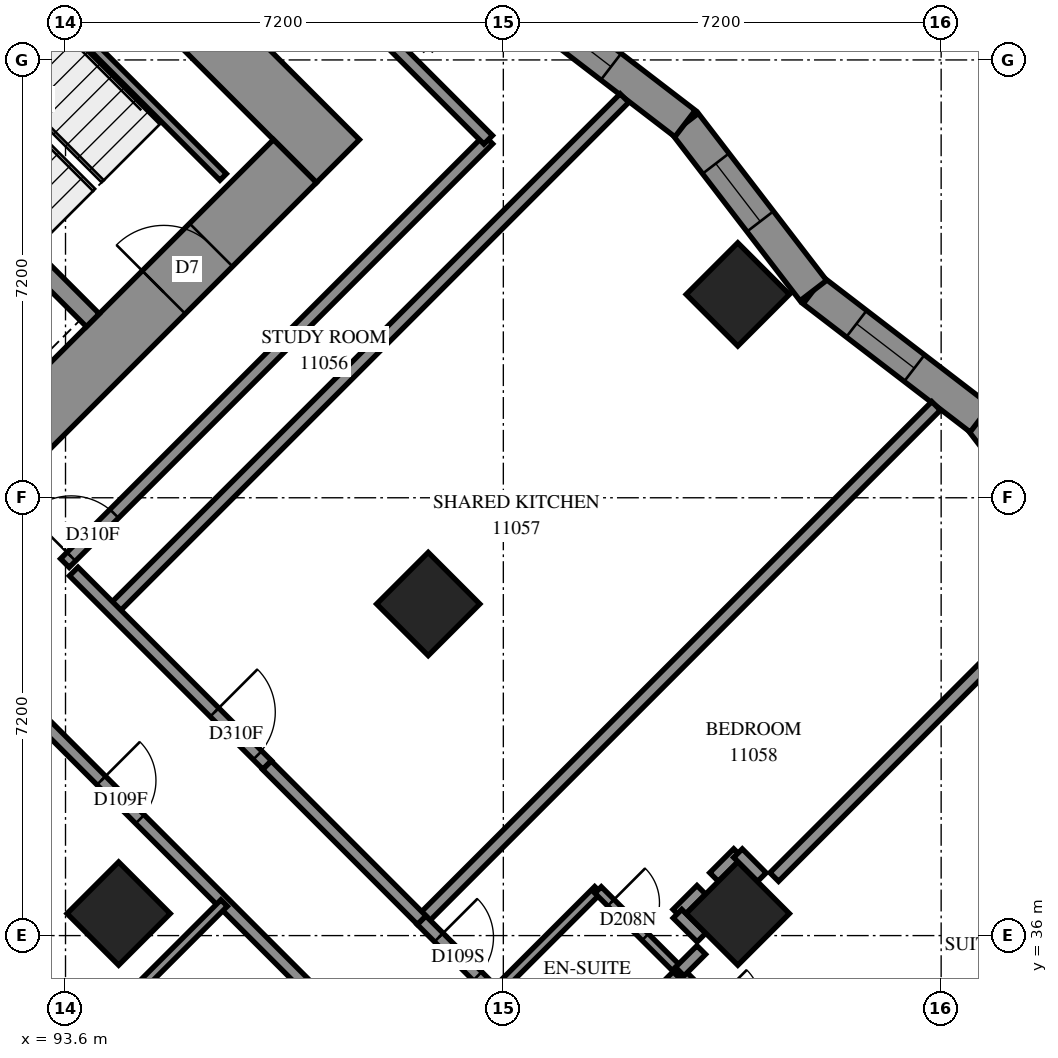
"""IFC4 building model, lengths in metres.
Left out: names, types, materials, properties, quantities, classifications, styles, units other than length and angle.
Written with IfcOpenShell. Run it as: python <this file> out.ifc"""

import sys

from ifc_helpers import new_model, si_unit, direction, frame, frame_2d, origin, origin_2d, place, context, subcontext, project, spatial, polyline, rectangle, outline, extrude, element, fill, save


model = new_model("IFC4")
c1 = context("Model", 3, precision=1e-05, world=origin(), true_north=direction((0.0, 1.0)))
c2 = subcontext(c1, "Body", "Model", "MODEL_VIEW")
j1 = project(units=[si_unit("LENGTHUNIT", "METRE"), si_unit("PLANEANGLEUNIT", "RADIAN")], contexts=[c1])
p1 = place(None, origin())
s1 = spatial("IfcSite", under=j1, at=p1, CompositionType="ELEMENT")
p2 = place(p1, origin())
s2 = spatial("IfcBuilding", under=s1, at=p2, CompositionType="ELEMENT")
p3 = place(p2, frame((0.0, 0.0, 44.0)))
s3 = spatial("IfcBuildingStorey", under=s2, at=p3, CompositionType="ELEMENT", Elevation=44.0)
for number, where, z_axis, x_axis in (
    (1, (104.656, 46.544, 0.0), (0.0, 0.0, 1.0), (0.707, -0.707, 0.0)),
    (2, (99.565, 41.453, 0.0), (0.0, 0.0, 1.0), (0.707, -0.707, 0.0)),
    (3, (94.474, 36.362, 0.0), (0.0, 0.0, 1.0), (0.707, -0.707, 0.0)),
    (4, (104.656, 36.362, 0.0), (0.0, 0.0, 1.0), (0.707, -0.707, 0.0)),
):
    element("IfcColumn", number, at=place(p3, frame(where, z_axis=z_axis, x_axis=x_axis)), inside=s3, PredefinedType="COLUMN", context=c2, shape_type="SweptSolid", body=[
        extrude(rectangle(XDim=1.2, YDim=1.2, at=origin_2d()), origin(), (0.0, 0.0, 1.0), 3.1),
    ])
p4 = place(p3, frame((86.483, 60.333, -0.3), z_axis=(0.0, 0.0, 1.0), x_axis=(0.70710983, -0.7071037324, 0.0)))
e5 = element("IfcWall", 5, at=p4, inside=s3, PredefinedType="SHEAR", context=c2, shape_type="SweptSolid", body=[
    extrude(rectangle(XDim=16.4, YDim=1.0, at=frame_2d((8.2, 0.0))), origin(), (0.0, 0.0, 1.0), 2.7),
])
p5 = place(p4, frame((11.0, 0.0, 0.3)))
e6 = element("IfcOpeningElement", 6, at=p5, cuts=e5, PredefinedType="OPENING", context=c2, shape_type="SweptSolid", body=[
    extrude(rectangle(XDim=0.8, YDim=2.1, at=frame_2d((0.4, 1.05))), frame((0.0, 0.51, 0.0), z_axis=(0.0, -1.0, 0.0), x_axis=(1.0, 0.0, 0.0)), (0.0, 0.0, 1.0), 1.02),
])
p6 = place(p3, frame((87.19, 38.554, -0.3), z_axis=(0.0, 0.0, 1.0), x_axis=(0.707103309, 0.7071102534, 0.0)))
e7 = element("IfcWall", 7, at=p6, inside=s3, PredefinedType="SHEAR", context=c2, shape_type="SweptSolid", body=[
    extrude(rectangle(XDim=14.4, YDim=1.0, at=frame_2d((7.2, 0.0))), origin(), (0.0, 0.0, 1.0), 2.7),
])
p7 = place(p6, frame((4.55, 0.0, 0.3)))
e8 = element("IfcOpeningElement", 8, at=p7, cuts=e7, PredefinedType="OPENING", context=c2, shape_type="SweptSolid", body=[
    extrude(rectangle(XDim=1.1, YDim=2.1, at=frame_2d((0.55, 1.05))), frame((0.0, 0.51, 0.0), z_axis=(0.0, -1.0, 0.0), x_axis=(1.0, 0.0, 0.0)), (0.0, 0.0, 1.0), 1.02),
])
p8 = place(p6, frame((11.35, 0.0, 0.3)))
e9 = element("IfcOpeningElement", 9, at=p8, cuts=e7, PredefinedType="OPENING", context=c2, shape_type="SweptSolid", body=[
    extrude(rectangle(XDim=1.1, YDim=2.1, at=frame_2d((0.55, 1.05))), frame((0.0, 0.51, 0.0), z_axis=(0.0, -1.0, 0.0), x_axis=(1.0, 0.0, 0.0)), (0.0, 0.0, 1.0), 1.02),
])
p9 = place(p3, frame((88.958, 51.211, 0.0), z_axis=(0.0, 0.0, 1.0), x_axis=(0.7070998367, -0.7071137256, 0.0)))
e10 = element("IfcWall", 10, at=p9, inside=s3, PredefinedType="SOLIDWALL", context=c2, shape_type="SweptSolid", body=[
    extrude(rectangle(XDim=7.2, YDim=0.3, at=frame_2d((3.6, 0.0))), origin(), (0.0, 0.0, 1.0), 3.1),
])
p10 = place(p3, frame((110.753, 41.752, 0.0), z_axis=(0.0, 0.0, 1.0), x_axis=(-0.6090043207, 0.7931669038, 0.0)))
e11 = element("IfcWall", 11, at=p10, inside=s3, PredefinedType="SOLIDWALL", context=c2, shape_type="SweptSolid", body=[
    extrude(outline(polyline([(0.036, -0.275), (3.499, -0.275), (3.427, 0.275), (-0.036, 0.275), (0.036, -0.275)])), origin(), (0.0, 0.0, 1.0), 3.1),
])
p11 = place(p10, frame((1.315, 0.0, 0.5)))
e12 = element("IfcOpeningElement", 12, at=p11, cuts=e11, PredefinedType="OPENING", context=c2, shape_type="SweptSolid", body=[
    extrude(rectangle(XDim=1.2, YDim=2.45, at=frame_2d((0.6, 1.225))), frame((0.0, 0.285, 0.0), z_axis=(0.0, -1.0, 0.0), x_axis=(1.0, 0.0, 0.0)), (0.0, 0.0, 1.0), 0.57),
])
p12 = place(p3, frame((108.644, 44.498, 0.0), z_axis=(0.0, 0.0, 1.0), x_axis=(-0.7931776144, 0.6089903711, 0.0)))
e13 = element("IfcWall", 13, at=p12, inside=s3, PredefinedType="SOLIDWALL", context=c2, shape_type="SweptSolid", body=[
    extrude(outline(polyline([(-0.036, -0.275), (3.427, -0.275), (3.499, 0.275), (0.036, 0.275), (-0.036, -0.275)])), origin(), (0.0, 0.0, 1.0), 3.1),
])
p13 = place(p12, frame((1.368, 0.0, 0.5)))
e14 = element("IfcOpeningElement", 14, at=p13, cuts=e13, PredefinedType="OPENING", context=c2, shape_type="SweptSolid", body=[
    extrude(rectangle(XDim=1.2, YDim=2.45, at=frame_2d((0.6, 1.225))), frame((0.0, 0.285, 0.0), z_axis=(0.0, -1.0, 0.0), x_axis=(1.0, 0.0, 0.0)), (0.0, 0.0, 1.0), 0.57),
])
p14 = place(p3, frame((105.898, 46.607, 0.0), z_axis=(0.0, 0.0, 1.0), x_axis=(-0.6089903711, 0.7931776144, 0.0)))
e15 = element("IfcWall", 15, at=p14, inside=s3, PredefinedType="SOLIDWALL", context=c2, shape_type="SweptSolid", body=[
    extrude(outline(polyline([(0.036, -0.275), (3.499, -0.275), (3.427, 0.275), (-0.036, 0.275), (0.036, -0.275)])), origin(), (0.0, 0.0, 1.0), 3.1),
])
p15 = place(p14, frame((1.434, 0.0, 0.5)))
e16 = element("IfcOpeningElement", 16, at=p15, cuts=e15, PredefinedType="OPENING", context=c2, shape_type="SweptSolid", body=[
    extrude(rectangle(XDim=1.2, YDim=2.45, at=frame_2d((0.6, 1.225))), frame((0.0, 0.285, 0.0), z_axis=(0.0, -1.0, 0.0), x_axis=(1.0, 0.0, 0.0)), (0.0, 0.0, 1.0), 0.57),
])
p16 = place(p3, frame((103.789, 49.354, 0.0), z_axis=(0.0, 0.0, 1.0), x_axis=(-0.7931776144, 0.6089903711, 0.0)))
e17 = element("IfcWall", 17, at=p16, inside=s3, PredefinedType="SOLIDWALL", context=c2, shape_type="SweptSolid", body=[
    extrude(outline(polyline([(-0.036, -0.275), (3.427, -0.275), (3.499, 0.275), (0.036, 0.275), (-0.036, -0.275)])), origin(), (0.0, 0.0, 1.0), 3.1),
])
p17 = place(p16, frame((1.536, 0.0, 0.5)))
e18 = element("IfcOpeningElement", 18, at=p17, cuts=e17, PredefinedType="OPENING", context=c2, shape_type="SweptSolid", body=[
    extrude(rectangle(XDim=1.2, YDim=2.45, at=frame_2d((0.6, 1.225))), frame((0.0, 0.285, 0.0), z_axis=(0.0, -1.0, 0.0), x_axis=(1.0, 0.0, 0.0)), (0.0, 0.0, 1.0), 0.57),
])
p18 = place(p3, frame((91.313, 53.354, 0.0), z_axis=(0.0, 0.0, 1.0), x_axis=(0.7071140275, -0.7070995348, 0.0)))
e19 = element("IfcWall", 19, at=p18, inside=s3, PredefinedType="PARTITIONING", context=c2, shape_type="SweptSolid", body=[
    extrude(rectangle(XDim=6.9, YDim=0.15, at=frame_2d((3.45, 0.0))), origin(), (0.0, 0.0, 1.0), 3.1),
])
p19 = place(p3, frame((99.459, 36.255, 0.0), z_axis=(0.0, 0.0, 1.0), x_axis=(0.7071903932, 0.7070231593, 0.0)))
e20 = element("IfcWall", 20, at=p19, inside=s3, PredefinedType="PARTITIONING", context=c2, shape_type="SweptSolid", body=[
    extrude(rectangle(XDim=11.959, YDim=0.2, at=frame_2d((5.98, 0.0))), origin(), (0.0, 0.0, 1.0), 3.1),
])
p20 = place(p3, frame((94.367, 41.349, 0.0), z_axis=(0.0, 0.0, 1.0), x_axis=(0.7071109781, 0.7071025843, 0.0)))
e21 = element("IfcWall", 21, at=p20, inside=s3, PredefinedType="PARTITIONING", context=c2, shape_type="SweptSolid", body=[
    extrude(rectangle(XDim=11.914, YDim=0.2, at=frame_2d((5.957, 0.0))), origin(), (0.0, 0.0, 1.0), 3.1),
])
p21 = place(p3, frame((93.59, 42.126, 0.0), z_axis=(0.0, 0.0, 1.0), x_axis=(0.7071067812, 0.7071067812, 0.0)))
e22 = element("IfcWall", 22, at=p21, inside=s3, PredefinedType="PARTITIONING", context=c2, shape_type="SweptSolid", body=[
    extrude(rectangle(XDim=9.849, YDim=0.2, at=frame_2d((4.924, 0.0))), origin(), (0.0, 0.0, 1.0), 3.1),
])
p22 = place(p21, frame((0.148, 0.0, 0.0)))
e23 = element("IfcOpeningElement", 23, at=p22, cuts=e22, PredefinedType="OPENING", context=c2, shape_type="SweptSolid", body=[
    extrude(rectangle(XDim=1.0, YDim=2.1, at=frame_2d((0.5, 1.05))), frame((0.0, 0.11, 0.0), z_axis=(0.0, -1.0, 0.0), x_axis=(1.0, 0.0, 0.0)), (0.0, 0.0, 1.0), 0.22),
])
p23 = place(p3, frame((92.243, 40.495, 0.0), z_axis=(0.0, 0.0, 1.0), x_axis=(0.7071067812, -0.7071067812, 0.0)))
e24 = element("IfcWall", 24, at=p23, inside=s3, PredefinedType="PARTITIONING", context=c2, shape_type="SweptSolid", body=[
    extrude(rectangle(XDim=8.101, YDim=0.2, at=frame_2d((4.05, 0.0))), origin(), (0.0, 0.0, 1.0), 3.1),
])
p24 = place(p23, frame((2.75, 0.0, 0.0)))
e25 = element("IfcOpeningElement", 25, at=p24, cuts=e24, PredefinedType="OPENING", context=c2, shape_type="SweptSolid", body=[
    extrude(rectangle(XDim=0.9, YDim=2.1, at=frame_2d((0.45, 1.05))), frame((0.0, 0.11, 0.0), z_axis=(0.0, -1.0, 0.0), x_axis=(1.0, 0.0, 0.0)), (0.0, 0.0, 1.0), 0.22),
])
p25 = place(p3, frame((99.455, 36.253, 0.0), z_axis=(0.0, 0.0, 1.0), x_axis=(0.7071067812, -0.7071067812, 0.0)))
e26 = element("IfcWall", 26, at=p25, inside=s3, PredefinedType="PARTITIONING", context=c2, shape_type="SweptSolid", body=[
    extrude(rectangle(XDim=7.201, YDim=0.2, at=frame_2d((3.601, 0.0))), origin(), (0.0, 0.0, 1.0), 3.1),
])
p26 = place(p25, frame((0.401, 0.0, 0.0)))
e27 = element("IfcOpeningElement", 27, at=p26, cuts=e26, PredefinedType="OPENING", context=c2, shape_type="SweptSolid", body=[
    extrude(rectangle(XDim=0.9, YDim=2.1, at=frame_2d((0.45, 1.05))), frame((0.0, 0.11, 0.0), z_axis=(0.0, -1.0, 0.0), x_axis=(1.0, 0.0, 0.0)), (0.0, 0.0, 1.0), 0.22),
])
p27 = place(p3, frame((105.255, 36.963, 0.0), z_axis=(0.0, 0.0, 1.0), x_axis=(0.7071067812, 0.7071067812, 0.0)))
e28 = element("IfcWall", 28, at=p27, inside=s3, PredefinedType="PARTITIONING", context=c2, shape_type="SweptSolid", body=[
    extrude(rectangle(XDim=5.504, YDim=0.2, at=frame_2d((2.752, 0.0))), origin(), (0.0, 0.0, 1.0), 3.1),
])
p28 = place(p3, frame((93.735, 41.987, 0.0), z_axis=(0.0, 0.0, 1.0), x_axis=(0.7071067812, -0.7071067812, 0.0)))
e29 = element("IfcWall", 29, at=p28, inside=s3, PredefinedType="PARTITIONING", context=c2, shape_type="SweptSolid", body=[
    extrude(rectangle(XDim=4.5, YDim=0.2, at=frame_2d((2.25, 0.0))), origin(), (0.0, 0.0, 1.0), 3.1),
])
p29 = place(p28, frame((3.274, 0.0, 0.0)))
e30 = element("IfcOpeningElement", 30, at=p29, cuts=e29, PredefinedType="OPENING", context=c2, shape_type="SweptSolid", body=[
    extrude(rectangle(XDim=1.0, YDim=2.1, at=frame_2d((0.5, 1.05))), frame((0.0, 0.11, 0.0), z_axis=(0.0, -1.0, 0.0), x_axis=(1.0, 0.0, 0.0)), (0.0, 0.0, 1.0), 0.22),
])
p30 = place(p3, frame((96.913, 38.801, 0.0), z_axis=(0.0, 0.0, 1.0), x_axis=(0.7068288851, -0.7073845681, 0.0)))
e31 = element("IfcWall", 31, at=p30, inside=s3, PredefinedType="PARTITIONING", context=c2, shape_type="SweptSolid", body=[
    extrude(rectangle(XDim=3.599, YDim=0.2, at=frame_2d((1.8, 0.0))), origin(), (0.0, 0.0, 1.0), 3.1),
])
p31 = place(p3, frame((98.783, 50.855, 0.0), z_axis=(0.0, 0.0, 1.0), x_axis=(0.7071067812, -0.7071067812, 0.0)))
e32 = element("IfcWall", 32, at=p31, inside=s3, PredefinedType="PARTITIONING", context=c2, shape_type="SweptSolid", body=[
    extrude(rectangle(XDim=2.5, YDim=0.2, at=frame_2d((1.25, 0.0))), origin(), (0.0, 0.0, 1.0), 3.1),
])
p32 = place(p3, frame((102.003, 33.711, 0.0), z_axis=(0.0, 0.0, 1.0), x_axis=(0.7071067812, 0.7071067812, 0.0)))
e33 = element("IfcWall", 33, at=p32, inside=s3, PredefinedType="PARTITIONING", context=c2, shape_type="SweptSolid", body=[
    extrude(rectangle(XDim=2.401, YDim=0.15, at=frame_2d((1.201, 0.0))), origin(), (0.0, 0.0, 1.0), 3.1),
])
for number, where, z_axis, x_axis in (
    (34, (94.511, 34.839, 0.0), (0.0, 0.0, 1.0), (0.708, 0.707, 0.0)),
    (35, (100.657, 35.057, 0.0), (0.0, 0.0, 1.0), (0.708, 0.707, 0.0)),
):
    element("IfcWall", number, at=place(p3, frame(where, z_axis=z_axis, x_axis=x_axis)), inside=s3, PredefinedType="PARTITIONING", context=c2, shape_type="SweptSolid", body=[
        extrude(rectangle(XDim=2.4, YDim=0.15, at=frame_2d((1.2, 0.0))), origin(), (0.0, 0.0, 1.0), 3.1),
    ])
p33 = place(p3, frame((103.701, 35.407, 0.0), z_axis=(0.0, 0.0, 1.0), x_axis=(0.7065800724, -0.7076330979, 0.0)))
e36 = element("IfcWall", 36, at=p33, inside=s3, PredefinedType="PARTITIONING", context=c2, shape_type="SweptSolid", body=[
    extrude(rectangle(XDim=1.899, YDim=0.15, at=frame_2d((0.95, 0.0))), origin(), (0.0, 0.0, 1.0), 3.1),
])
p34 = place(p33, frame((0.759, 0.0, 0.0)))
e37 = element("IfcOpeningElement", 37, at=p34, cuts=e36, PredefinedType="OPENING", context=c2, shape_type="SweptSolid", body=[
    extrude(rectangle(XDim=0.8, YDim=2.1, at=frame_2d((0.4, 1.05))), frame((0.0, 0.085, 0.0), z_axis=(0.0, -1.0, 0.0), x_axis=(1.0, 0.0, 0.0)), (0.0, 0.0, 1.0), 0.17),
])
p35 = place(p3, frame((102.358, 36.75, 0.0), z_axis=(0.0, 0.0, 1.0), x_axis=(0.7076330979, -0.7065800724, 0.0)))
e38 = element("IfcWall", 38, at=p35, inside=s3, PredefinedType="PARTITIONING", context=c2, shape_type="SweptSolid", body=[
    extrude(rectangle(XDim=1.899, YDim=0.15, at=frame_2d((0.95, 0.0))), origin(), (0.0, 0.0, 1.0), 3.1),
])
p36 = place(p35, frame((0.296, 0.0, 0.0)))
e39 = element("IfcOpeningElement", 39, at=p36, cuts=e38, PredefinedType="OPENING", context=c2, shape_type="SweptSolid", body=[
    extrude(rectangle(XDim=0.8, YDim=2.1, at=frame_2d((0.4, 1.05))), frame((0.0, 0.085, 0.0), z_axis=(0.0, -1.0, 0.0), x_axis=(1.0, 0.0, 0.0)), (0.0, 0.0, 1.0), 0.17),
])
for number, where, z_axis, x_axis in (
    (40, (103.661, 36.359, 0.0), (0.0, 0.0, 1.0), (0.707, 0.707, 0.0)),
    (41, (104.265, 36.963, 0.0), (0.0, 0.0, 1.0), (0.707, 0.707, 0.0)),
):
    element("IfcWall", number, at=place(p3, frame(where, z_axis=z_axis, x_axis=x_axis)), inside=s3, PredefinedType="PARTITIONING", context=c2, shape_type="SweptSolid", body=[
        extrude(rectangle(XDim=0.557, YDim=0.2, at=frame_2d((0.279, 0.0))), origin(), (0.0, 0.0, 1.0), 3.1),
    ])
for number, where, z_axis, x_axis in (
    (42, (104.659, 37.355, 0.0), (0.0, 0.0, 1.0), (0.705, -0.709, 0.0)),
    (43, (103.664, 36.36, 0.0), (0.0, 0.0, 1.0), (0.709, -0.705, 0.0)),
):
    element("IfcWall", number, at=place(p3, frame(where, z_axis=z_axis, x_axis=x_axis)), inside=s3, PredefinedType="PARTITIONING", context=c2, shape_type="SweptSolid", body=[
        extrude(rectangle(XDim=0.556, YDim=0.2, at=frame_2d((0.278, 0.0))), origin(), (0.0, 0.0, 1.0), 3.1),
    ])
p37 = place(p3, frame((103.701, 35.409, 0.0), z_axis=(0.0, 0.0, 1.0), x_axis=(0.7071067812, 0.7071067812, 0.0)))
e44 = element("IfcWall", 44, at=p37, inside=s3, PredefinedType="PARTITIONING", context=c2, shape_type="SweptSolid", body=[
    extrude(rectangle(XDim=0.501, YDim=0.2, at=frame_2d((0.25, 0.0))), origin(), (0.0, 0.0, 1.0), 3.1),
])
p38 = place(p13, origin())
e45 = element("IfcWindow", 45, at=p38, inside=s3, PartitioningType="SINGLE_PANEL", PredefinedType="WINDOW", context=c2, shape_type="SweptSolid", body=[
    extrude(rectangle(XDim=1.2, YDim=2.45, at=frame_2d((0.6, 1.225))), frame((0.0, 0.155, 0.0), z_axis=(0.0, -1.0, 0.0), x_axis=(1.0, 0.0, 0.0)), (0.0, 0.0, 1.0), 0.06),
])
fill(e14, e45)
p39 = place(p15, origin())
e46 = element("IfcWindow", 46, at=p39, inside=s3, PartitioningType="SINGLE_PANEL", PredefinedType="WINDOW", context=c2, shape_type="SweptSolid", body=[
    extrude(rectangle(XDim=1.2, YDim=2.45, at=frame_2d((0.6, 1.225))), frame((0.0, 0.155, 0.0), z_axis=(0.0, -1.0, 0.0), x_axis=(1.0, 0.0, 0.0)), (0.0, 0.0, 1.0), 0.06),
])
fill(e16, e46)
p40 = place(p17, origin())
e47 = element("IfcWindow", 47, at=p40, inside=s3, PartitioningType="SINGLE_PANEL", PredefinedType="WINDOW", context=c2, shape_type="SweptSolid", body=[
    extrude(rectangle(XDim=1.2, YDim=2.45, at=frame_2d((0.6, 1.225))), frame((0.0, 0.155, 0.0), z_axis=(0.0, -1.0, 0.0), x_axis=(1.0, 0.0, 0.0)), (0.0, 0.0, 1.0), 0.06),
])
fill(e18, e47)
p41 = place(p8, origin())
e48 = element("IfcDoor", 48, at=p41, inside=s3, OperationType="SINGLE_SWING_RIGHT", PredefinedType="DOOR", context=c2, shape_type="SweptSolid", body=[
    extrude(rectangle(XDim=1.1, YDim=2.1, at=frame_2d((0.55, 1.05))), frame((0.0, 0.025, 0.0), z_axis=(0.0, -1.0, 0.0), x_axis=(1.0, 0.0, 0.0)), (0.0, 0.0, 1.0), 0.05),
])
fill(e9, e48)
p42 = place(p22, origin())
e49 = element("IfcDoor", 49, at=p42, inside=s3, OperationType="SINGLE_SWING_LEFT", PredefinedType="DOOR", context=c2, shape_type="SweptSolid", body=[
    extrude(rectangle(XDim=1.0, YDim=2.1, at=frame_2d((0.5, 1.05))), frame((0.0, 0.025, 0.0), z_axis=(0.0, -1.0, 0.0), x_axis=(1.0, 0.0, 0.0)), (0.0, 0.0, 1.0), 0.05),
])
fill(e23, e49)
p43 = place(p29, origin())
e50 = element("IfcDoor", 50, at=p43, inside=s3, OperationType="SINGLE_SWING_RIGHT", PredefinedType="DOOR", context=c2, shape_type="SweptSolid", body=[
    extrude(rectangle(XDim=1.0, YDim=2.1, at=frame_2d((0.5, 1.05))), frame((0.0, 0.025, 0.0), z_axis=(0.0, -1.0, 0.0), x_axis=(1.0, 0.0, 0.0)), (0.0, 0.0, 1.0), 0.05),
])
fill(e30, e50)
p44 = place(p26, origin())
e51 = element("IfcDoor", 51, at=p44, inside=s3, OperationType="SINGLE_SWING_RIGHT", PredefinedType="DOOR", context=c2, shape_type="SweptSolid", body=[
    extrude(rectangle(XDim=0.9, YDim=2.1, at=frame_2d((0.45, 1.05))), frame((0.0, 0.025, 0.0), z_axis=(0.0, -1.0, 0.0), x_axis=(1.0, 0.0, 0.0)), (0.0, 0.0, 1.0), 0.05),
])
fill(e27, e51)
p45 = place(p36, origin())
e52 = element("IfcDoor", 52, at=p45, inside=s3, OperationType="SINGLE_SWING_RIGHT", PredefinedType="DOOR", context=c2, shape_type="SweptSolid", body=[
    extrude(rectangle(XDim=0.8, YDim=2.1, at=frame_2d((0.4, 1.05))), frame((0.0, 0.025, 0.0), z_axis=(0.0, -1.0, 0.0), x_axis=(1.0, 0.0, 0.0)), (0.0, 0.0, 1.0), 0.05),
])
fill(e39, e52)
p46 = place(p24, origin())
e53 = element("IfcDoor", 53, at=p46, inside=s3, OperationType="SINGLE_SWING_LEFT", PredefinedType="DOOR", context=c2, shape_type="SweptSolid", body=[
    extrude(rectangle(XDim=0.9, YDim=2.1, at=frame_2d((0.45, 1.05))), frame((0.0, 0.025, 0.0), z_axis=(0.0, -1.0, 0.0), x_axis=(1.0, 0.0, 0.0)), (0.0, 0.0, 1.0), 0.05),
])
fill(e25, e53)
save(model, sys.argv[1])
